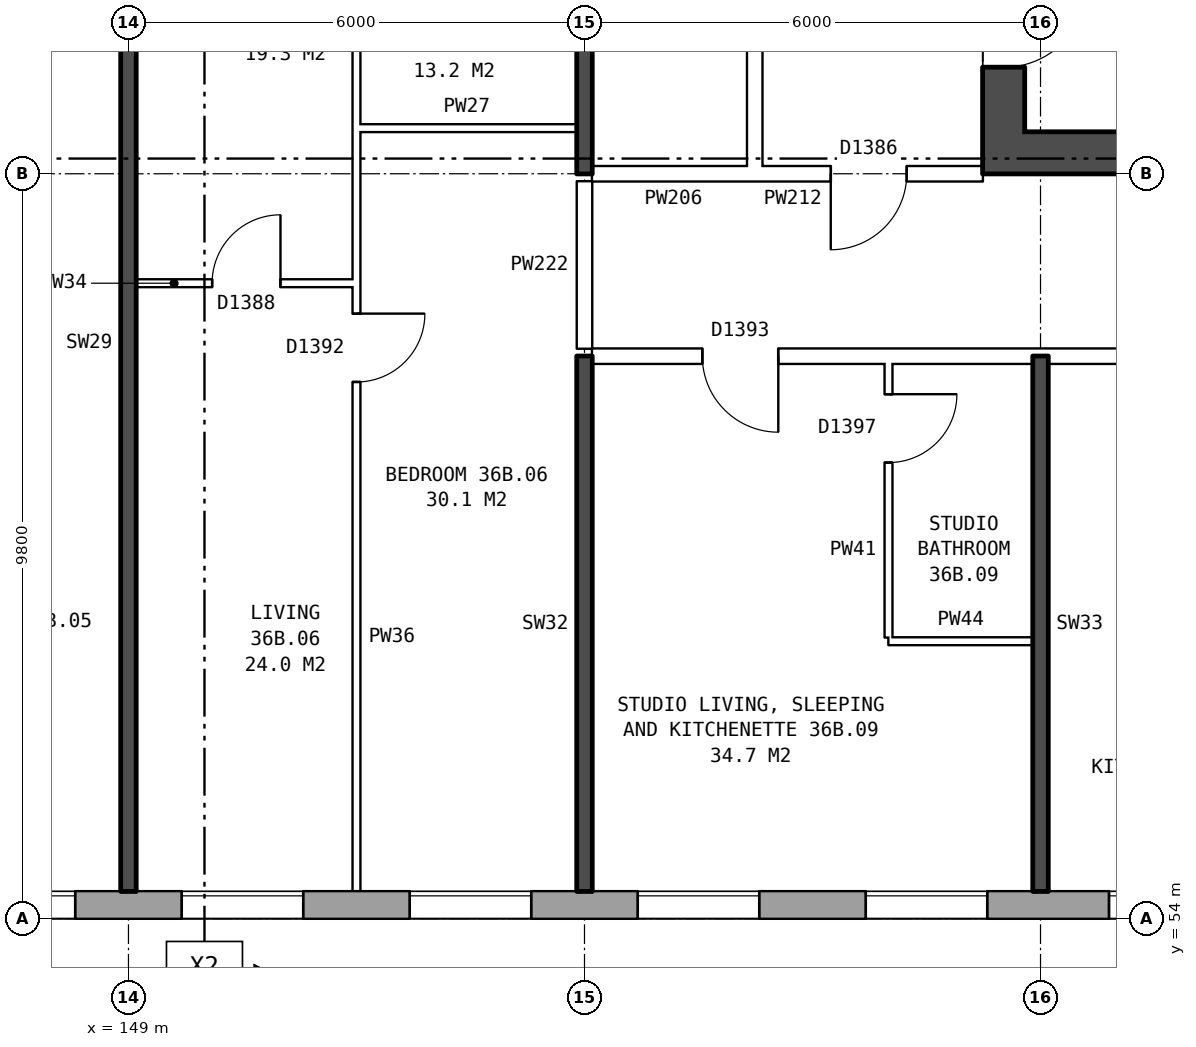
"""IFC4 building model, lengths in metres.
Left out: names, types, materials, properties, quantities, classifications, styles, units other than length and angle.
Written with IfcOpenShell. Run it as: python <this file> out.ifc"""

import sys

from ifc_helpers import new_model, si_unit, direction, frame, frame_2d, origin, place, context, subcontext, project, spatial, rectangle, extrude, element, fill, save


model = new_model("IFC4")
c1 = context("Model", 3, precision=1e-05, world=origin(), true_north=direction((0.0, 1.0)))
c2 = subcontext(c1, "Body", "Model", "MODEL_VIEW")
j1 = project(units=[si_unit("LENGTHUNIT", "METRE"), si_unit("PLANEANGLEUNIT", "RADIAN")], contexts=[c1])
p1 = place(None, origin())
s1 = spatial("IfcSite", under=j1, at=p1, CompositionType="ELEMENT")
p2 = place(p1, origin())
s2 = spatial("IfcBuilding", under=s1, at=p2, CompositionType="ELEMENT")
p3 = place(p2, frame((0.0, 0.0, 129.9)))
s3 = spatial("IfcBuildingStorey", under=s2, at=p3, CompositionType="ELEMENT", Elevation=129.9)
p4 = place(p3, frame((134.075, 54.18, 0.0), z_axis=(0.0, 0.0, 1.0), x_axis=(1.0, 0.0, 0.0)))
e1 = element("IfcWall", 1, at=p4, inside=s3, PredefinedType="STANDARD", context=c2, shape_type="SweptSolid", body=[
    extrude(rectangle(XDim=35.601, YDim=0.36, at=frame_2d((17.8, 0.0))), origin(), (0.0, 0.0, 1.0), 2.85),
])
p5 = place(p4, frame((0.625, 0.0, 0.8)))
e2 = element("IfcOpeningElement", 2, at=p5, cuts=e1, PredefinedType="OPENING", context=c2, shape_type="SweptSolid", body=[
    extrude(rectangle(XDim=1.6, YDim=1.8, at=frame_2d((0.8, 0.9))), frame((0.0, 0.19, 0.0), z_axis=(0.0, -1.0, 0.0), x_axis=(1.0, 0.0, 0.0)), (0.0, 0.0, 1.0), 0.38),
])
p6 = place(p4, frame((3.625, 0.0, 0.8)))
e3 = element("IfcOpeningElement", 3, at=p6, cuts=e1, PredefinedType="OPENING", context=c2, shape_type="SweptSolid", body=[
    extrude(rectangle(XDim=1.6, YDim=1.8, at=frame_2d((0.8, 0.9))), frame((0.0, 0.19, 0.0), z_axis=(0.0, -1.0, 0.0), x_axis=(1.0, 0.0, 0.0)), (0.0, 0.0, 1.0), 0.38),
])
p7 = place(p4, frame((5.525, 0.0, 0.8)))
e4 = element("IfcOpeningElement", 4, at=p7, cuts=e1, PredefinedType="OPENING", context=c2, shape_type="SweptSolid", body=[
    extrude(rectangle(XDim=1.2, YDim=1.8, at=frame_2d((0.6, 0.9))), frame((0.0, 0.19, 0.0), z_axis=(0.0, -1.0, 0.0), x_axis=(1.0, 0.0, 0.0)), (0.0, 0.0, 1.0), 0.38),
])
p8 = place(p4, frame((9.625, 0.0, 0.8)))
e5 = element("IfcOpeningElement", 5, at=p8, cuts=e1, PredefinedType="OPENING", context=c2, shape_type="SweptSolid", body=[
    extrude(rectangle(XDim=1.6, YDim=1.8, at=frame_2d((0.8, 0.9))), frame((0.0, 0.19, 0.0), z_axis=(0.0, -1.0, 0.0), x_axis=(1.0, 0.0, 0.0)), (0.0, 0.0, 1.0), 0.38),
])
p9 = place(p4, frame((12.625, 0.0, 0.8)))
e6 = element("IfcOpeningElement", 6, at=p9, cuts=e1, PredefinedType="OPENING", context=c2, shape_type="SweptSolid", body=[
    extrude(rectangle(XDim=1.6, YDim=1.8, at=frame_2d((0.8, 0.9))), frame((0.0, 0.19, 0.0), z_axis=(0.0, -1.0, 0.0), x_axis=(1.0, 0.0, 0.0)), (0.0, 0.0, 1.0), 0.38),
])
p10 = place(p4, frame((15.625, 0.0, 0.8)))
e7 = element("IfcOpeningElement", 7, at=p10, cuts=e1, PredefinedType="OPENING", context=c2, shape_type="SweptSolid", body=[
    extrude(rectangle(XDim=1.6, YDim=1.8, at=frame_2d((0.8, 0.9))), frame((0.0, 0.19, 0.0), z_axis=(0.0, -1.0, 0.0), x_axis=(1.0, 0.0, 0.0)), (0.0, 0.0, 1.0), 0.38),
])
p11 = place(p4, frame((18.625, 0.0, 0.8)))
e8 = element("IfcOpeningElement", 8, at=p11, cuts=e1, PredefinedType="OPENING", context=c2, shape_type="SweptSolid", body=[
    extrude(rectangle(XDim=1.6, YDim=1.8, at=frame_2d((0.8, 0.9))), frame((0.0, 0.19, 0.0), z_axis=(0.0, -1.0, 0.0), x_axis=(1.0, 0.0, 0.0)), (0.0, 0.0, 1.0), 0.38),
])
p12 = place(p4, frame((21.625, 0.0, 0.8)))
e9 = element("IfcOpeningElement", 9, at=p12, cuts=e1, PredefinedType="OPENING", context=c2, shape_type="SweptSolid", body=[
    extrude(rectangle(XDim=1.6, YDim=1.8, at=frame_2d((0.8, 0.9))), frame((0.0, 0.19, 0.0), z_axis=(0.0, -1.0, 0.0), x_axis=(1.0, 0.0, 0.0)), (0.0, 0.0, 1.0), 0.38),
])
p13 = place(p4, frame((24.625, 0.0, 0.8)))
e10 = element("IfcOpeningElement", 10, at=p13, cuts=e1, PredefinedType="OPENING", context=c2, shape_type="SweptSolid", body=[
    extrude(rectangle(XDim=1.6, YDim=1.8, at=frame_2d((0.8, 0.9))), frame((0.0, 0.19, 0.0), z_axis=(0.0, -1.0, 0.0), x_axis=(1.0, 0.0, 0.0)), (0.0, 0.0, 1.0), 0.38),
])
p14 = place(p4, frame((27.825, 0.0, 1.7)))
e11 = element("IfcOpeningElement", 11, at=p14, cuts=e1, PredefinedType="OPENING", context=c2, shape_type="SweptSolid", body=[
    extrude(rectangle(XDim=0.6, YDim=0.9, at=frame_2d((0.3, 0.45))), frame((0.0, 0.19, 0.0), z_axis=(0.0, -1.0, 0.0), x_axis=(1.0, 0.0, 0.0)), (0.0, 0.0, 1.0), 0.38),
])
p15 = place(p4, frame((30.625, 0.0, 0.8)))
e12 = element("IfcOpeningElement", 12, at=p15, cuts=e1, PredefinedType="OPENING", context=c2, shape_type="SweptSolid", body=[
    extrude(rectangle(XDim=1.6, YDim=1.8, at=frame_2d((0.8, 0.9))), frame((0.0, 0.19, 0.0), z_axis=(0.0, -1.0, 0.0), x_axis=(1.0, 0.0, 0.0)), (0.0, 0.0, 1.0), 0.38),
])
p16 = place(p4, frame((33.625, 0.0, 0.8)))
e13 = element("IfcOpeningElement", 13, at=p16, cuts=e1, PredefinedType="OPENING", context=c2, shape_type="SweptSolid", body=[
    extrude(rectangle(XDim=1.6, YDim=1.8, at=frame_2d((0.8, 0.9))), frame((0.0, 0.19, 0.0), z_axis=(0.0, -1.0, 0.0), x_axis=(1.0, 0.0, 0.0)), (0.0, 0.0, 1.0), 0.38),
])
p17 = place(p4, frame((7.025, 0.0, 1.6)))
e14 = element("IfcOpeningElement", 14, at=p17, cuts=e1, PredefinedType="OPENING", context=c2, shape_type="SweptSolid", body=[
    extrude(rectangle(XDim=0.6, YDim=0.9, at=frame_2d((0.3, 0.45))), frame((0.0, 0.19, 0.0), z_axis=(0.0, -1.0, 0.0), x_axis=(1.0, 0.0, 0.0)), (0.0, 0.0, 1.0), 0.38),
])
p18 = place(p4, frame((28.725, 0.0, 0.8)))
e15 = element("IfcOpeningElement", 15, at=p18, cuts=e1, PredefinedType="OPENING", context=c2, shape_type="SweptSolid", body=[
    extrude(rectangle(XDim=1.6, YDim=1.8, at=frame_2d((0.8, 0.9))), frame((0.0, 0.19, 0.0), z_axis=(0.0, -1.0, 0.0), x_axis=(1.0, 0.0, 0.0)), (0.0, 0.0, 1.0), 0.38),
])
p19 = place(p3, frame((160.515, 76.2, 0.0), z_axis=(0.0, 0.0, 1.0), x_axis=(0.0, -1.0, 0.0)))
e16 = element("IfcWall", 16, at=p19, inside=s3, PredefinedType="SHEAR", context=c2, shape_type="SweptSolid", body=[
    extrude(rectangle(XDim=12.4, YDim=0.55, at=frame_2d((6.2, 0.0))), origin(), (0.0, 0.0, 1.0), 2.85),
])
p20 = place(p19, frame((1.325, 0.0, 0.0)))
e17 = element("IfcOpeningElement", 17, at=p20, cuts=e16, PredefinedType="OPENING", context=c2, shape_type="SweptSolid", body=[
    extrude(rectangle(XDim=1.1, YDim=2.1, at=frame_2d((0.55, 1.05))), frame((0.0, 0.285, 0.0), z_axis=(0.0, -1.0, 0.0), x_axis=(1.0, 0.0, 0.0)), (0.0, 0.0, 1.0), 0.57),
])
p21 = place(p19, frame((3.825, 0.0, 0.0)))
e18 = element("IfcOpeningElement", 18, at=p21, cuts=e16, PredefinedType="OPENING", context=c2, shape_type="SweptSolid", body=[
    extrude(rectangle(XDim=0.85, YDim=2.1, at=frame_2d((0.425, 1.05))), frame((0.0, 0.285, 0.0), z_axis=(0.0, -1.0, 0.0), x_axis=(1.0, 0.0, 0.0)), (0.0, 0.0, 1.0), 0.57),
])
p22 = place(p19, frame((5.975, 0.0, 0.0)))
e19 = element("IfcOpeningElement", 19, at=p22, cuts=e16, PredefinedType="OPENING", context=c2, shape_type="SweptSolid", body=[
    extrude(rectangle(XDim=0.85, YDim=2.1, at=frame_2d((0.425, 1.05))), frame((0.0, 0.285, 0.0), z_axis=(0.0, -1.0, 0.0), x_axis=(1.0, 0.0, 0.0)), (0.0, 0.0, 1.0), 0.57),
])
p23 = place(p19, frame((9.9, 0.0, 0.0)))
e20 = element("IfcOpeningElement", 20, at=p23, cuts=e16, PredefinedType="OPENING", context=c2, shape_type="SweptSolid", body=[
    extrude(rectangle(XDim=1.1, YDim=2.1, at=frame_2d((0.55, 1.05))), frame((0.0, 0.285, 0.0), z_axis=(0.0, -1.0, 0.0), x_axis=(1.0, 0.0, 0.0)), (0.0, 0.0, 1.0), 0.57),
])
p24 = place(p19, frame((8.125, 0.0, 0.0)))
e21 = element("IfcOpeningElement", 21, at=p24, cuts=e16, PredefinedType="OPENING", context=c2, shape_type="SweptSolid", body=[
    extrude(rectangle(XDim=0.85, YDim=2.1, at=frame_2d((0.425, 1.05))), frame((0.0, 0.285, 0.0), z_axis=(0.0, -1.0, 0.0), x_axis=(1.0, 0.0, 0.0)), (0.0, 0.0, 1.0), 0.57),
])
p25 = place(p3, frame((160.79, 64.075, 0.0), z_axis=(0.0, 0.0, 1.0), x_axis=(1.0, 0.0, 0.0)))
e22 = element("IfcWall", 22, at=p25, inside=s3, PredefinedType="SHEAR", context=c2, shape_type="SweptSolid", body=[
    extrude(rectangle(XDim=7.3, YDim=0.55, at=frame_2d((3.65, 0.0))), origin(), (0.0, 0.0, 1.0), 2.85),
])
p26 = place(p3, frame((157.24, 63.9, 0.0), z_axis=(0.0, 0.0, 1.0), x_axis=(0.0, 1.0, 0.0)))
e23 = element("IfcWall", 23, at=p26, inside=s3, PredefinedType="PARTITIONING", context=c2, shape_type="SweptSolid", body=[
    extrude(rectangle(XDim=12.2, YDim=0.2, at=frame_2d((6.1, 0.0))), origin(), (0.0, 0.0, 1.0), 2.85),
])
p27 = place(p26, frame((5.1, 0.0, 0.0)))
e24 = element("IfcOpeningElement", 24, at=p27, cuts=e23, PredefinedType="OPENING", context=c2, shape_type="SweptSolid", body=[
    extrude(rectangle(XDim=2.0, YDim=2.1, at=frame_2d((1.0, 1.05))), frame((0.0, 0.11, 0.0), z_axis=(0.0, -1.0, 0.0), x_axis=(1.0, 0.0, 0.0)), (0.0, 0.0, 1.0), 0.22),
])
p28 = place(p3, frame((159.0, 57.65, 0.0), z_axis=(0.0, 0.0, 1.0), x_axis=(1.0, 0.0, 0.0)))
e25 = element("IfcWall", 25, at=p28, inside=s3, PredefinedType="PARTITIONING", context=c2, shape_type="SweptSolid", body=[
    extrude(rectangle(XDim=1.9, YDim=0.1, at=frame_2d((0.95, 0.0))), origin(), (0.0, 0.0, 1.0), 2.85),
])
p29 = place(p3, frame((155.1, 61.4, 0.0), z_axis=(0.0, 0.0, 1.0), x_axis=(1.0, 0.0, 0.0)))
e26 = element("IfcWall", 26, at=p29, inside=s3, PredefinedType="PARTITIONING", context=c2, shape_type="SweptSolid", body=[
    extrude(rectangle(XDim=17.29, YDim=0.2, at=frame_2d((8.645, 0.0))), origin(), (0.0, 0.0, 1.0), 2.85),
])
p30 = place(p29, frame((1.45, 0.0, 0.0)))
e27 = element("IfcOpeningElement", 27, at=p30, cuts=e26, PredefinedType="OPENING", context=c2, shape_type="SweptSolid", body=[
    extrude(rectangle(XDim=1.0, YDim=2.1, at=frame_2d((0.5, 1.05))), frame((0.0, 0.11, 0.0), z_axis=(0.0, -1.0, 0.0), x_axis=(1.0, 0.0, 0.0)), (0.0, 0.0, 1.0), 0.22),
])
p31 = place(p29, frame((8.4, 0.0, 0.0)))
e28 = element("IfcOpeningElement", 28, at=p31, cuts=e26, PredefinedType="OPENING", context=c2, shape_type="SweptSolid", body=[
    extrude(rectangle(XDim=1.0, YDim=2.1, at=frame_2d((0.5, 1.05))), frame((0.0, 0.11, 0.0), z_axis=(0.0, -1.0, 0.0), x_axis=(1.0, 0.0, 0.0)), (0.0, 0.0, 1.0), 0.22),
])
p32 = place(p3, frame((149.1, 62.36, 0.0), z_axis=(0.0, 0.0, 1.0), x_axis=(1.0, 0.0, 0.0)))
e29 = element("IfcWall", 29, at=p32, inside=s3, PredefinedType="PARTITIONING", context=c2, shape_type="SweptSolid", body=[
    extrude(rectangle(XDim=2.9, YDim=0.1, at=frame_2d((1.45, 0.0))), origin(), (0.0, 0.0, 1.0), 2.85),
])
p33 = place(p32, frame((1.0, 0.0, 0.0)))
e30 = element("IfcOpeningElement", 30, at=p33, cuts=e29, PredefinedType="OPENING", context=c2, shape_type="SweptSolid", body=[
    extrude(rectangle(XDim=0.9, YDim=2.1, at=frame_2d((0.45, 1.05))), frame((0.0, 0.06, 0.0), z_axis=(0.0, -1.0, 0.0), x_axis=(1.0, 0.0, 0.0)), (0.0, 0.0, 1.0), 0.12),
])
p34 = place(p3, frame((155.1, 63.8, 0.0), z_axis=(0.0, 0.0, 1.0), x_axis=(1.0, 0.0, 0.0)))
e31 = element("IfcWall", 31, at=p34, inside=s3, PredefinedType="PARTITIONING", context=c2, shape_type="SweptSolid", body=[
    extrude(rectangle(XDim=2.14, YDim=0.2, at=frame_2d((1.07, 0.0))), origin(), (0.0, 0.0, 1.0), 2.85),
])
p35 = place(p3, frame((157.24, 63.8, 0.0), z_axis=(0.0, 0.0, 1.0), x_axis=(1.0, 0.0, 0.0)))
e32 = element("IfcWall", 32, at=p35, inside=s3, PredefinedType="PARTITIONING", context=c2, shape_type="SweptSolid", body=[
    extrude(rectangle(XDim=3.0, YDim=0.2, at=frame_2d((1.5, 0.0))), origin(), (0.0, 0.0, 1.0), 2.85),
])
p36 = place(p35, frame((1.0, 0.0, 0.0)))
e33 = element("IfcOpeningElement", 33, at=p36, cuts=e32, PredefinedType="OPENING", context=c2, shape_type="SweptSolid", body=[
    extrude(rectangle(XDim=1.0, YDim=2.1, at=frame_2d((0.5, 1.05))), frame((0.0, 0.11, 0.0), z_axis=(0.0, -1.0, 0.0), x_axis=(1.0, 0.0, 0.0)), (0.0, 0.0, 1.0), 0.22),
])
p37 = place(p3, frame((152.0, 64.4, 0.0), z_axis=(0.0, 0.0, 1.0), x_axis=(1.0, 0.0, 0.0)))
e34 = element("IfcWall", 34, at=p37, inside=s3, PredefinedType="PARTITIONING", context=c2, shape_type="SweptSolid", body=[
    extrude(rectangle(XDim=2.9, YDim=0.1, at=frame_2d((1.45, 0.0))), origin(), (0.0, 0.0, 1.0), 2.85),
])
p38 = place(p3, frame((149.0, 54.36, 0.0), z_axis=(0.0, 0.0, 1.0), x_axis=(0.0, 1.0, 0.0)))
e35 = element("IfcWall", 35, at=p38, inside=s3, PredefinedType="SOLIDWALL", context=c2, shape_type="SweptSolid", body=[
    extrude(rectangle(XDim=14.44, YDim=0.2, at=frame_2d((7.22, 0.0))), origin(), (0.0, 0.0, 1.0), 2.85),
])
p39 = place(p3, frame((152.0, 54.36, 0.0), z_axis=(0.0, 0.0, 1.0), x_axis=(0.0, 1.0, 0.0)))
e36 = element("IfcWall", 36, at=p39, inside=s3, PredefinedType="PARTITIONING", context=c2, shape_type="SweptSolid", body=[
    extrude(rectangle(XDim=14.34, YDim=0.1, at=frame_2d((7.17, 0.0))), origin(), (0.0, 0.0, 1.0), 2.85),
])
p40 = place(p39, frame((6.7, 0.0, 0.0)))
e37 = element("IfcOpeningElement", 37, at=p40, cuts=e36, PredefinedType="OPENING", context=c2, shape_type="SweptSolid", body=[
    extrude(rectangle(XDim=0.9, YDim=2.1, at=frame_2d((0.45, 1.05))), frame((0.0, 0.06, 0.0), z_axis=(0.0, -1.0, 0.0), x_axis=(1.0, 0.0, 0.0)), (0.0, 0.0, 1.0), 0.12),
])
p41 = place(p39, frame((13.04, 0.0, 0.0)))
e38 = element("IfcOpeningElement", 38, at=p41, cuts=e36, PredefinedType="OPENING", context=c2, shape_type="SweptSolid", body=[
    extrude(rectangle(XDim=0.9, YDim=2.1, at=frame_2d((0.45, 1.05))), frame((0.0, 0.06, 0.0), z_axis=(0.0, -1.0, 0.0), x_axis=(1.0, 0.0, 0.0)), (0.0, 0.0, 1.0), 0.12),
])
p42 = place(p3, frame((155.0, 54.36, 0.0), z_axis=(0.0, 0.0, 1.0), x_axis=(0.0, 1.0, 0.0)))
e39 = element("IfcWall", 39, at=p42, inside=s3, PredefinedType="SOLIDWALL", context=c2, shape_type="SweptSolid", body=[
    extrude(rectangle(XDim=7.04, YDim=0.2, at=frame_2d((3.52, 0.0))), origin(), (0.0, 0.0, 1.0), 2.85),
])
p43 = place(p3, frame((155.0, 61.5, 0.0), z_axis=(0.0, 0.0, 1.0), x_axis=(0.0, 1.0, 0.0)))
e40 = element("IfcWall", 40, at=p43, inside=s3, PredefinedType="PARTITIONING", context=c2, shape_type="SweptSolid", body=[
    extrude(rectangle(XDim=2.2, YDim=0.2, at=frame_2d((1.1, 0.0))), origin(), (0.0, 0.0, 1.0), 2.85),
])
p44 = place(p3, frame((155.0, 63.8, 0.0), z_axis=(0.0, 0.0, 1.0), x_axis=(0.0, 1.0, 0.0)))
e41 = element("IfcWall", 41, at=p44, inside=s3, PredefinedType="SOLIDWALL", context=c2, shape_type="SweptSolid", body=[
    extrude(rectangle(XDim=5.0, YDim=0.2, at=frame_2d((2.5, 0.0))), origin(), (0.0, 0.0, 1.0), 2.85),
])
p45 = place(p3, frame((159.0, 57.7, 0.0), z_axis=(0.0, 0.0, 1.0), x_axis=(0.0, 1.0, 0.0)))
e42 = element("IfcWall", 42, at=p45, inside=s3, PredefinedType="PARTITIONING", context=c2, shape_type="SweptSolid", body=[
    extrude(rectangle(XDim=3.6, YDim=0.1, at=frame_2d((1.8, 0.0))), origin(), (0.0, 0.0, 1.0), 2.85),
])
p46 = place(p45, frame((2.3, 0.0, 0.0)))
e43 = element("IfcOpeningElement", 43, at=p46, cuts=e42, PredefinedType="OPENING", context=c2, shape_type="SweptSolid", body=[
    extrude(rectangle(XDim=0.9, YDim=2.1, at=frame_2d((0.45, 1.05))), frame((0.0, 0.06, 0.0), z_axis=(0.0, -1.0, 0.0), x_axis=(1.0, 0.0, 0.0)), (0.0, 0.0, 1.0), 0.12),
])
p47 = place(p3, frame((161.0, 54.36, 0.0), z_axis=(0.0, 0.0, 1.0), x_axis=(0.0, 1.0, 0.0)))
e44 = element("IfcWall", 44, at=p47, inside=s3, PredefinedType="SOLIDWALL", context=c2, shape_type="SweptSolid", body=[
    extrude(rectangle(XDim=7.04, YDim=0.2, at=frame_2d((3.52, 0.0))), origin(), (0.0, 0.0, 1.0), 2.85),
])
p48 = place(p9, origin())
e45 = element("IfcWindow", 45, at=p48, inside=s3, PartitioningType="SINGLE_PANEL", PredefinedType="WINDOW", context=c2, shape_type="SweptSolid", body=[
    extrude(rectangle(XDim=1.6, YDim=1.8, at=frame_2d((0.8, 0.9))), frame((0.0, 0.15, 0.0), z_axis=(0.0, -1.0, 0.0), x_axis=(1.0, 0.0, 0.0)), (0.0, 0.0, 1.0), 0.06),
])
fill(e6, e45)
p49 = place(p10, origin())
e46 = element("IfcWindow", 46, at=p49, inside=s3, PartitioningType="SINGLE_PANEL", PredefinedType="WINDOW", context=c2, shape_type="SweptSolid", body=[
    extrude(rectangle(XDim=1.6, YDim=1.8, at=frame_2d((0.8, 0.9))), frame((0.0, 0.15, 0.0), z_axis=(0.0, -1.0, 0.0), x_axis=(1.0, 0.0, 0.0)), (0.0, 0.0, 1.0), 0.06),
])
fill(e7, e46)
p50 = place(p11, origin())
e47 = element("IfcWindow", 47, at=p50, inside=s3, PartitioningType="SINGLE_PANEL", PredefinedType="WINDOW", context=c2, shape_type="SweptSolid", body=[
    extrude(rectangle(XDim=1.6, YDim=1.8, at=frame_2d((0.8, 0.9))), frame((0.0, 0.15, 0.0), z_axis=(0.0, -1.0, 0.0), x_axis=(1.0, 0.0, 0.0)), (0.0, 0.0, 1.0), 0.06),
])
fill(e8, e47)
p51 = place(p12, origin())
e48 = element("IfcWindow", 48, at=p51, inside=s3, PartitioningType="SINGLE_PANEL", PredefinedType="WINDOW", context=c2, shape_type="SweptSolid", body=[
    extrude(rectangle(XDim=1.6, YDim=1.8, at=frame_2d((0.8, 0.9))), frame((0.0, 0.15, 0.0), z_axis=(0.0, -1.0, 0.0), x_axis=(1.0, 0.0, 0.0)), (0.0, 0.0, 1.0), 0.06),
])
fill(e9, e48)
p52 = place(p13, origin())
e49 = element("IfcWindow", 49, at=p52, inside=s3, PartitioningType="SINGLE_PANEL", PredefinedType="WINDOW", context=c2, shape_type="SweptSolid", body=[
    extrude(rectangle(XDim=1.6, YDim=1.8, at=frame_2d((0.8, 0.9))), frame((0.0, 0.15, 0.0), z_axis=(0.0, -1.0, 0.0), x_axis=(1.0, 0.0, 0.0)), (0.0, 0.0, 1.0), 0.06),
])
fill(e10, e49)
p53 = place(p14, origin())
e50 = element("IfcWindow", 50, at=p53, inside=s3, PartitioningType="SINGLE_PANEL", PredefinedType="WINDOW", context=c2, shape_type="SweptSolid", body=[
    extrude(rectangle(XDim=0.6, YDim=0.9, at=frame_2d((0.3, 0.45))), frame((0.0, 0.15, 0.0), z_axis=(0.0, -1.0, 0.0), x_axis=(1.0, 0.0, 0.0)), (0.0, 0.0, 1.0), 0.06),
])
fill(e11, e50)
p54 = place(p23, origin())
e51 = element("IfcDoor", 51, at=p54, inside=s3, OperationType="SINGLE_SWING_LEFT", PredefinedType="DOOR", context=c2, shape_type="SweptSolid", body=[
    extrude(rectangle(XDim=1.1, YDim=2.1, at=frame_2d((0.55, 1.05))), frame((0.0, 0.26, 0.0), z_axis=(0.0, -1.0, 0.0), x_axis=(1.0, 0.0, 0.0)), (0.0, 0.0, 1.0), 0.05),
])
fill(e20, e51)
p55 = place(p36, frame((1.0, 0.0, 0.0), z_axis=(0.0, 0.0, 1.0), x_axis=(-1.0, 0.0, 0.0)))
e52 = element("IfcDoor", 52, at=p55, inside=s3, OperationType="SINGLE_SWING_RIGHT", PredefinedType="DOOR", context=c2, shape_type="SweptSolid", body=[
    extrude(rectangle(XDim=1.0, YDim=2.1, at=frame_2d((0.5, 1.05))), frame((0.0, 0.025, 0.0), z_axis=(0.0, -1.0, 0.0), x_axis=(1.0, 0.0, 0.0)), (0.0, 0.0, 1.0), 0.05),
])
fill(e33, e52)
p56 = place(p40, frame((0.9, 0.0, 0.0), z_axis=(0.0, 0.0, 1.0), x_axis=(-1.0, 0.0, 0.0)))
e53 = element("IfcDoor", 53, at=p56, inside=s3, OperationType="SINGLE_SWING_LEFT", PredefinedType="DOOR", context=c2, shape_type="SweptSolid", body=[
    extrude(rectangle(XDim=0.9, YDim=2.1, at=frame_2d((0.45, 1.05))), frame((0.0, 0.025, 0.0), z_axis=(0.0, -1.0, 0.0), x_axis=(1.0, 0.0, 0.0)), (0.0, 0.0, 1.0), 0.05),
])
fill(e37, e53)
p57 = place(p33, origin())
e54 = element("IfcDoor", 54, at=p57, inside=s3, OperationType="SINGLE_SWING_RIGHT", PredefinedType="DOOR", context=c2, shape_type="SweptSolid", body=[
    extrude(rectangle(XDim=0.9, YDim=2.1, at=frame_2d((0.45, 1.05))), frame((0.0, 0.025, 0.0), z_axis=(0.0, -1.0, 0.0), x_axis=(1.0, 0.0, 0.0)), (0.0, 0.0, 1.0), 0.05),
])
fill(e30, e54)
p58 = place(p30, frame((1.0, 0.0, 0.0), z_axis=(0.0, 0.0, 1.0), x_axis=(-1.0, 0.0, 0.0)))
e55 = element("IfcDoor", 55, at=p58, inside=s3, OperationType="SINGLE_SWING_LEFT", PredefinedType="DOOR", context=c2, shape_type="SweptSolid", body=[
    extrude(rectangle(XDim=1.0, YDim=2.1, at=frame_2d((0.5, 1.05))), frame((0.0, 0.025, 0.0), z_axis=(0.0, -1.0, 0.0), x_axis=(1.0, 0.0, 0.0)), (0.0, 0.0, 1.0), 0.05),
])
fill(e27, e55)
p59 = place(p46, frame((0.9, 0.0, 0.0), z_axis=(0.0, 0.0, 1.0), x_axis=(-1.0, 0.0, 0.0)))
e56 = element("IfcDoor", 56, at=p59, inside=s3, OperationType="SINGLE_SWING_LEFT", PredefinedType="DOOR", context=c2, shape_type="SweptSolid", body=[
    extrude(rectangle(XDim=0.9, YDim=2.1, at=frame_2d((0.45, 1.05))), frame((0.0, 0.025, 0.0), z_axis=(0.0, -1.0, 0.0), x_axis=(1.0, 0.0, 0.0)), (0.0, 0.0, 1.0), 0.05),
])
fill(e43, e56)
save(model, sys.argv[1])
